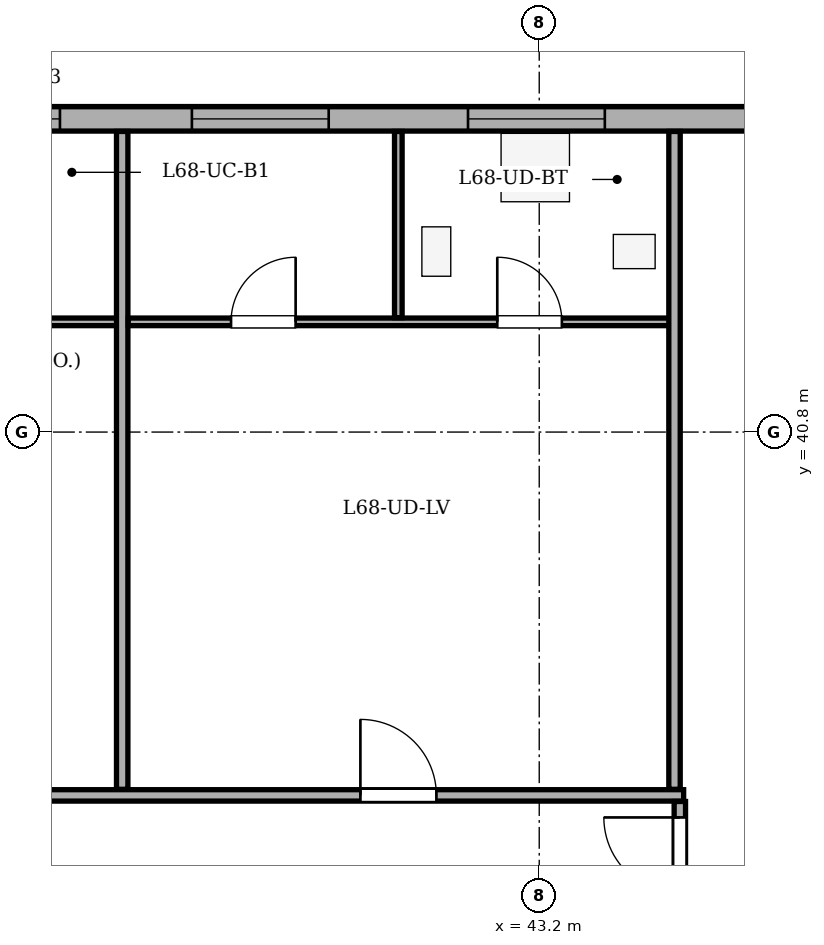
"""IFC4 building model, lengths in metres.
Left out: names, types, materials, properties, quantities, classifications, styles, units other than length and angle.
Written with IfcOpenShell. Run it as: python <this file> out.ifc"""

import sys

from ifc_helpers import new_model, si_unit, direction, frame, frame_2d, origin, place, context, subcontext, project, spatial, rectangle, extrude, element, fill, save


model = new_model("IFC4")
c1 = context("Model", 3, precision=1e-05, world=origin(), true_north=direction((0.0, 1.0)))
c2 = subcontext(c1, "Body", "Model", "MODEL_VIEW")
j1 = project(units=[si_unit("LENGTHUNIT", "METRE"), si_unit("PLANEANGLEUNIT", "RADIAN")], contexts=[c1])
p1 = place(None, origin())
s1 = spatial("IfcSite", under=j1, at=p1, CompositionType="ELEMENT")
p2 = place(p1, origin())
s2 = spatial("IfcBuilding", under=s1, at=p2, CompositionType="ELEMENT")
p3 = place(p2, frame((0.0, 0.0, 258.5)))
s3 = spatial("IfcBuildingStorey", under=s2, at=p3, CompositionType="ELEMENT", Elevation=258.5)
p4 = place(p3, frame((14.7, 44.92, 0.0), z_axis=(0.0, 0.0, 1.0), x_axis=(1.0, 0.0, 0.0)))
e1 = element("IfcWall", 1, at=p4, inside=s3, PredefinedType="STANDARD", context=c2, shape_type="SweptSolid", body=[
    extrude(rectangle(XDim=37.0, YDim=0.32, at=frame_2d((18.5, 0.0))), origin(), (0.0, 0.0, 1.0), 2.725),
])
p5 = place(p4, frame((9.0, 0.0, 0.0)))
e2 = element("IfcOpeningElement", 2, at=p5, cuts=e1, PredefinedType="OPENING", context=c2, shape_type="SweptSolid", body=[
    extrude(rectangle(XDim=1.0, YDim=2.02, at=frame_2d((0.5, 1.01))), frame((0.0, 0.17, 0.0), z_axis=(0.0, -1.0, 0.0), x_axis=(1.0, 0.0, 0.0)), (0.0, 0.0, 1.0), 0.34),
])
p6 = place(p4, frame((1.292, 0.0, 0.75)))
e3 = element("IfcOpeningElement", 3, at=p6, cuts=e1, PredefinedType="OPENING", context=c2, shape_type="SweptSolid", body=[
    extrude(rectangle(XDim=1.25, YDim=1.7, at=frame_2d((0.625, 0.85))), frame((0.0, 0.17, 0.0), z_axis=(0.0, -1.0, 0.0), x_axis=(1.0, 0.0, 0.0)), (0.0, 0.0, 1.0), 0.34),
])
p7 = place(p4, frame((23.93, 0.0, 0.75)))
e4 = element("IfcOpeningElement", 4, at=p7, cuts=e1, PredefinedType="OPENING", context=c2, shape_type="SweptSolid", body=[
    extrude(rectangle(XDim=1.8, YDim=1.7, at=frame_2d((0.9, 0.85))), frame((0.0, 0.17, 0.0), z_axis=(0.0, -1.0, 0.0), x_axis=(1.0, 0.0, 0.0)), (0.0, 0.0, 1.0), 0.34),
])
p8 = place(p4, frame((27.563, 0.0, 0.75)))
e5 = element("IfcOpeningElement", 5, at=p8, cuts=e1, PredefinedType="OPENING", context=c2, shape_type="SweptSolid", body=[
    extrude(rectangle(XDim=1.8, YDim=1.7, at=frame_2d((0.9, 0.85))), frame((0.0, 0.17, 0.0), z_axis=(0.0, -1.0, 0.0), x_axis=(1.0, 0.0, 0.0)), (0.0, 0.0, 1.0), 0.34),
])
p9 = place(p4, frame((31.315, 0.0, 0.75)))
e6 = element("IfcOpeningElement", 6, at=p9, cuts=e1, PredefinedType="OPENING", context=c2, shape_type="SweptSolid", body=[
    extrude(rectangle(XDim=1.8, YDim=1.7, at=frame_2d((0.9, 0.85))), frame((0.0, 0.17, 0.0), z_axis=(0.0, -1.0, 0.0), x_axis=(1.0, 0.0, 0.0)), (0.0, 0.0, 1.0), 0.34),
])
p10 = place(p4, frame((33.965, 0.0, 0.75)))
e7 = element("IfcOpeningElement", 7, at=p10, cuts=e1, PredefinedType="OPENING", context=c2, shape_type="SweptSolid", body=[
    extrude(rectangle(XDim=1.8, YDim=1.7, at=frame_2d((0.9, 0.85))), frame((0.0, 0.17, 0.0), z_axis=(0.0, -1.0, 0.0), x_axis=(1.0, 0.0, 0.0)), (0.0, 0.0, 1.0), 0.34),
])
p11 = place(p4, frame((21.444, 0.0, 0.75)))
e8 = element("IfcOpeningElement", 8, at=p11, cuts=e1, PredefinedType="OPENING", context=c2, shape_type="SweptSolid", body=[
    extrude(rectangle(XDim=0.75, YDim=1.45, at=frame_2d((0.375, 0.725))), frame((0.0, 0.17, 0.0), z_axis=(0.0, -1.0, 0.0), x_axis=(1.0, 0.0, 0.0)), (0.0, 0.0, 1.0), 0.34),
])
p12 = place(p3, frame((14.58, 36.02, 0.0), z_axis=(0.0, 0.0, 1.0), x_axis=(1.0, 0.0, 0.0)))
e9 = element("IfcWall", 9, at=p12, inside=s3, PredefinedType="PARTITIONING", context=c2, shape_type="SweptSolid", body=[
    extrude(rectangle(XDim=30.52, YDim=0.15, at=frame_2d((15.26, 0.0))), origin(), (0.0, 0.0, 1.0), 3.1),
])
p13 = place(p12, frame((3.253, 0.0, 0.0)))
e10 = element("IfcOpeningElement", 10, at=p13, cuts=e9, PredefinedType="OPENING", context=c2, shape_type="SweptSolid", body=[
    extrude(rectangle(XDim=1.0, YDim=2.1, at=frame_2d((0.5, 1.05))), frame((0.0, 0.085, 0.0), z_axis=(0.0, -1.0, 0.0), x_axis=(1.0, 0.0, 0.0)), (0.0, 0.0, 1.0), 0.17),
])
p14 = place(p12, frame((10.823, 0.0, 0.0)))
e11 = element("IfcOpeningElement", 11, at=p14, cuts=e9, PredefinedType="OPENING", context=c2, shape_type="SweptSolid", body=[
    extrude(rectangle(XDim=1.0, YDim=2.1, at=frame_2d((0.5, 1.05))), frame((0.0, 0.085, 0.0), z_axis=(0.0, -1.0, 0.0), x_axis=(1.0, 0.0, 0.0)), (0.0, 0.0, 1.0), 0.17),
])
p15 = place(p12, frame((18.697, 0.0, 0.0)))
e12 = element("IfcOpeningElement", 12, at=p15, cuts=e9, PredefinedType="OPENING", context=c2, shape_type="SweptSolid", body=[
    extrude(rectangle(XDim=1.0, YDim=2.1, at=frame_2d((0.5, 1.05))), frame((0.0, 0.085, 0.0), z_axis=(0.0, -1.0, 0.0), x_axis=(1.0, 0.0, 0.0)), (0.0, 0.0, 1.0), 0.17),
])
p16 = place(p12, frame((26.267, 0.0, 0.0)))
e13 = element("IfcOpeningElement", 13, at=p16, cuts=e9, PredefinedType="OPENING", context=c2, shape_type="SweptSolid", body=[
    extrude(rectangle(XDim=1.0, YDim=2.1, at=frame_2d((0.5, 1.05))), frame((0.0, 0.085, 0.0), z_axis=(0.0, -1.0, 0.0), x_axis=(1.0, 0.0, 0.0)), (0.0, 0.0, 1.0), 0.17),
])
p17 = place(p3, frame((29.92, 42.25, 0.0), z_axis=(0.0, 0.0, 1.0), x_axis=(1.0, 0.0, 0.0)))
e14 = element("IfcWall", 14, at=p17, inside=s3, PredefinedType="PARTITIONING", context=c2, shape_type="SweptSolid", body=[
    extrude(rectangle(XDim=7.833, YDim=0.1, at=frame_2d((3.917, 0.0))), origin(), (0.0, 0.0, 1.0), 3.1),
])
p18 = place(p17, frame((0.625, 0.0, 0.0)))
e15 = element("IfcOpeningElement", 15, at=p18, cuts=e14, PredefinedType="OPENING", context=c2, shape_type="SweptSolid", body=[
    extrude(rectangle(XDim=0.85, YDim=2.05, at=frame_2d((0.425, 1.025))), frame((0.0, 0.06, 0.0), z_axis=(0.0, -1.0, 0.0), x_axis=(1.0, 0.0, 0.0)), (0.0, 0.0, 1.0), 0.12),
])
p19 = place(p17, frame((2.939, 0.0, 0.0)))
e16 = element("IfcOpeningElement", 16, at=p19, cuts=e14, PredefinedType="OPENING", context=c2, shape_type="SweptSolid", body=[
    extrude(rectangle(XDim=0.85, YDim=2.05, at=frame_2d((0.425, 1.025))), frame((0.0, 0.06, 0.0), z_axis=(0.0, -1.0, 0.0), x_axis=(1.0, 0.0, 0.0)), (0.0, 0.0, 1.0), 0.12),
])
p20 = place(p17, frame((5.72, 0.0, 0.0)))
e17 = element("IfcOpeningElement", 17, at=p20, cuts=e14, PredefinedType="OPENING", context=c2, shape_type="SweptSolid", body=[
    extrude(rectangle(XDim=0.9, YDim=2.05, at=frame_2d((0.45, 1.025))), frame((0.0, 0.06, 0.0), z_axis=(0.0, -1.0, 0.0), x_axis=(1.0, 0.0, 0.0)), (0.0, 0.0, 1.0), 0.12),
])
p21 = place(p3, frame((37.713, 36.1, 0.0), z_axis=(0.0, 0.0, 1.0), x_axis=(0.0, 1.0, 0.0)))
e18 = element("IfcWall", 18, at=p21, inside=s3, PredefinedType="PARTITIONING", context=c2, shape_type="SweptSolid", body=[
    extrude(rectangle(XDim=8.655, YDim=0.15, at=frame_2d((4.327, 0.0))), origin(), (0.0, 0.0, 1.0), 3.1),
])
p22 = place(p3, frame((37.793, 42.25, 0.0), z_axis=(0.0, 0.0, 1.0), x_axis=(1.0, 0.0, 0.0)))
e19 = element("IfcWall", 19, at=p22, inside=s3, PredefinedType="PARTITIONING", context=c2, shape_type="SweptSolid", body=[
    extrude(rectangle(XDim=7.227, YDim=0.1, at=frame_2d((3.614, 0.0))), origin(), (0.0, 0.0, 1.0), 3.1),
])
p23 = place(p22, frame((1.352, 0.0, 0.0)))
e20 = element("IfcOpeningElement", 20, at=p23, cuts=e19, PredefinedType="OPENING", context=c2, shape_type="SweptSolid", body=[
    extrude(rectangle(XDim=0.85, YDim=2.05, at=frame_2d((0.425, 1.025))), frame((0.0, 0.06, 0.0), z_axis=(0.0, -1.0, 0.0), x_axis=(1.0, 0.0, 0.0)), (0.0, 0.0, 1.0), 0.12),
])
p24 = place(p22, frame((4.855, 0.0, 0.0)))
e21 = element("IfcOpeningElement", 21, at=p24, cuts=e19, PredefinedType="OPENING", context=c2, shape_type="SweptSolid", body=[
    extrude(rectangle(XDim=0.85, YDim=2.05, at=frame_2d((0.425, 1.025))), frame((0.0, 0.06, 0.0), z_axis=(0.0, -1.0, 0.0), x_axis=(1.0, 0.0, 0.0)), (0.0, 0.0, 1.0), 0.12),
])
p25 = place(p3, frame((41.346, 42.305, 0.0), z_axis=(0.0, 0.0, 1.0), x_axis=(0.0, 1.0, 0.0)))
e22 = element("IfcWall", 22, at=p25, inside=s3, PredefinedType="PARTITIONING", context=c2, shape_type="SweptSolid", body=[
    extrude(rectangle(XDim=2.45, YDim=0.1, at=frame_2d((1.225, 0.0))), origin(), (0.0, 0.0, 1.0), 3.1),
])
p26 = place(p3, frame((44.98, 36.1, 0.0), z_axis=(0.0, 0.0, 1.0), x_axis=(0.0, 1.0, 0.0)))
e23 = element("IfcWall", 23, at=p26, inside=s3, PredefinedType="PARTITIONING", context=c2, shape_type="SweptSolid", body=[
    extrude(rectangle(XDim=8.655, YDim=0.15, at=frame_2d((4.327, 0.0))), origin(), (0.0, 0.0, 1.0), 2.725),
])
p27 = place(p3, frame((45.05, 34.15, 0.0), z_axis=(0.0, 0.0, 1.0), x_axis=(0.0, 1.0, 0.0)))
e24 = element("IfcWall", 24, at=p27, inside=s3, PredefinedType="PARTITIONING", context=c2, shape_type="SweptSolid", body=[
    extrude(rectangle(XDim=1.79, YDim=0.15, at=frame_2d((0.895, 0.0))), origin(), (0.0, 0.0, 1.0), 2.725),
])
p28 = place(p27, frame((0.58, 0.0, 0.0)))
e25 = element("IfcOpeningElement", 25, at=p28, cuts=e24, PredefinedType="OPENING", context=c2, shape_type="SweptSolid", body=[
    extrude(rectangle(XDim=1.0, YDim=2.1, at=frame_2d((0.5, 1.05))), frame((0.0, 0.085, 0.0), z_axis=(0.0, -1.0, 0.0), x_axis=(1.0, 0.0, 0.0)), (0.0, 0.0, 1.0), 0.17),
])
p29 = place(p7, origin())
e26 = element("IfcWindow", 26, at=p29, inside=s3, PartitioningType="SINGLE_PANEL", PredefinedType="WINDOW", context=c2, shape_type="SweptSolid", body=[
    extrude(rectangle(XDim=1.8, YDim=1.7, at=frame_2d((0.9, 0.85))), frame((0.0, -0.01, 0.0), z_axis=(0.0, -1.0, 0.0), x_axis=(1.0, 0.0, 0.0)), (0.0, 0.0, 1.0), 0.06),
])
fill(e4, e26)
p30 = place(p8, origin())
e27 = element("IfcWindow", 27, at=p30, inside=s3, PartitioningType="SINGLE_PANEL", PredefinedType="WINDOW", context=c2, shape_type="SweptSolid", body=[
    extrude(rectangle(XDim=1.8, YDim=1.7, at=frame_2d((0.9, 0.85))), frame((0.0, -0.01, 0.0), z_axis=(0.0, -1.0, 0.0), x_axis=(1.0, 0.0, 0.0)), (0.0, 0.0, 1.0), 0.06),
])
fill(e5, e27)
p31 = place(p11, origin())
e28 = element("IfcWindow", 28, at=p31, inside=s3, PartitioningType="SINGLE_PANEL", PredefinedType="WINDOW", context=c2, shape_type="SweptSolid", body=[
    extrude(rectangle(XDim=0.75, YDim=1.45, at=frame_2d((0.375, 0.725))), frame((0.0, -0.01, 0.0), z_axis=(0.0, -1.0, 0.0), x_axis=(1.0, 0.0, 0.0)), (0.0, 0.0, 1.0), 0.06),
])
fill(e8, e28)
p32 = place(p16, origin())
e29 = element("IfcDoor", 29, at=p32, inside=s3, OperationType="SINGLE_SWING_LEFT", PredefinedType="DOOR", context=c2, shape_type="SweptSolid", body=[
    extrude(rectangle(XDim=1.0, YDim=2.1, at=frame_2d((0.5, 1.05))), frame((0.0, 0.025, 0.0), z_axis=(0.0, -1.0, 0.0), x_axis=(1.0, 0.0, 0.0)), (0.0, 0.0, 1.0), 0.05),
])
fill(e13, e29)
p33 = place(p23, origin())
e30 = element("IfcDoor", 30, at=p33, inside=s3, OperationType="SINGLE_SWING_RIGHT", PredefinedType="DOOR", context=c2, shape_type="SweptSolid", body=[
    extrude(rectangle(XDim=0.85, YDim=2.05, at=frame_2d((0.425, 1.025))), frame((0.0, 0.025, 0.0), z_axis=(0.0, -1.0, 0.0), x_axis=(1.0, 0.0, 0.0)), (0.0, 0.0, 1.0), 0.05),
])
fill(e20, e30)
p34 = place(p24, origin())
e31 = element("IfcDoor", 31, at=p34, inside=s3, OperationType="SINGLE_SWING_LEFT", PredefinedType="DOOR", context=c2, shape_type="SweptSolid", body=[
    extrude(rectangle(XDim=0.85, YDim=2.05, at=frame_2d((0.425, 1.025))), frame((0.0, 0.025, 0.0), z_axis=(0.0, -1.0, 0.0), x_axis=(1.0, 0.0, 0.0)), (0.0, 0.0, 1.0), 0.05),
])
fill(e21, e31)
p35 = place(p28, origin())
e32 = element("IfcDoor", 32, at=p35, inside=s3, OperationType="SINGLE_SWING_RIGHT", PredefinedType="DOOR", context=c2, shape_type="SweptSolid", body=[
    extrude(rectangle(XDim=1.0, YDim=2.1, at=frame_2d((0.5, 1.05))), frame((0.0, 0.025, 0.0), z_axis=(0.0, -1.0, 0.0), x_axis=(1.0, 0.0, 0.0)), (0.0, 0.0, 1.0), 0.05),
])
fill(e25, e32)
save(model, sys.argv[1])
